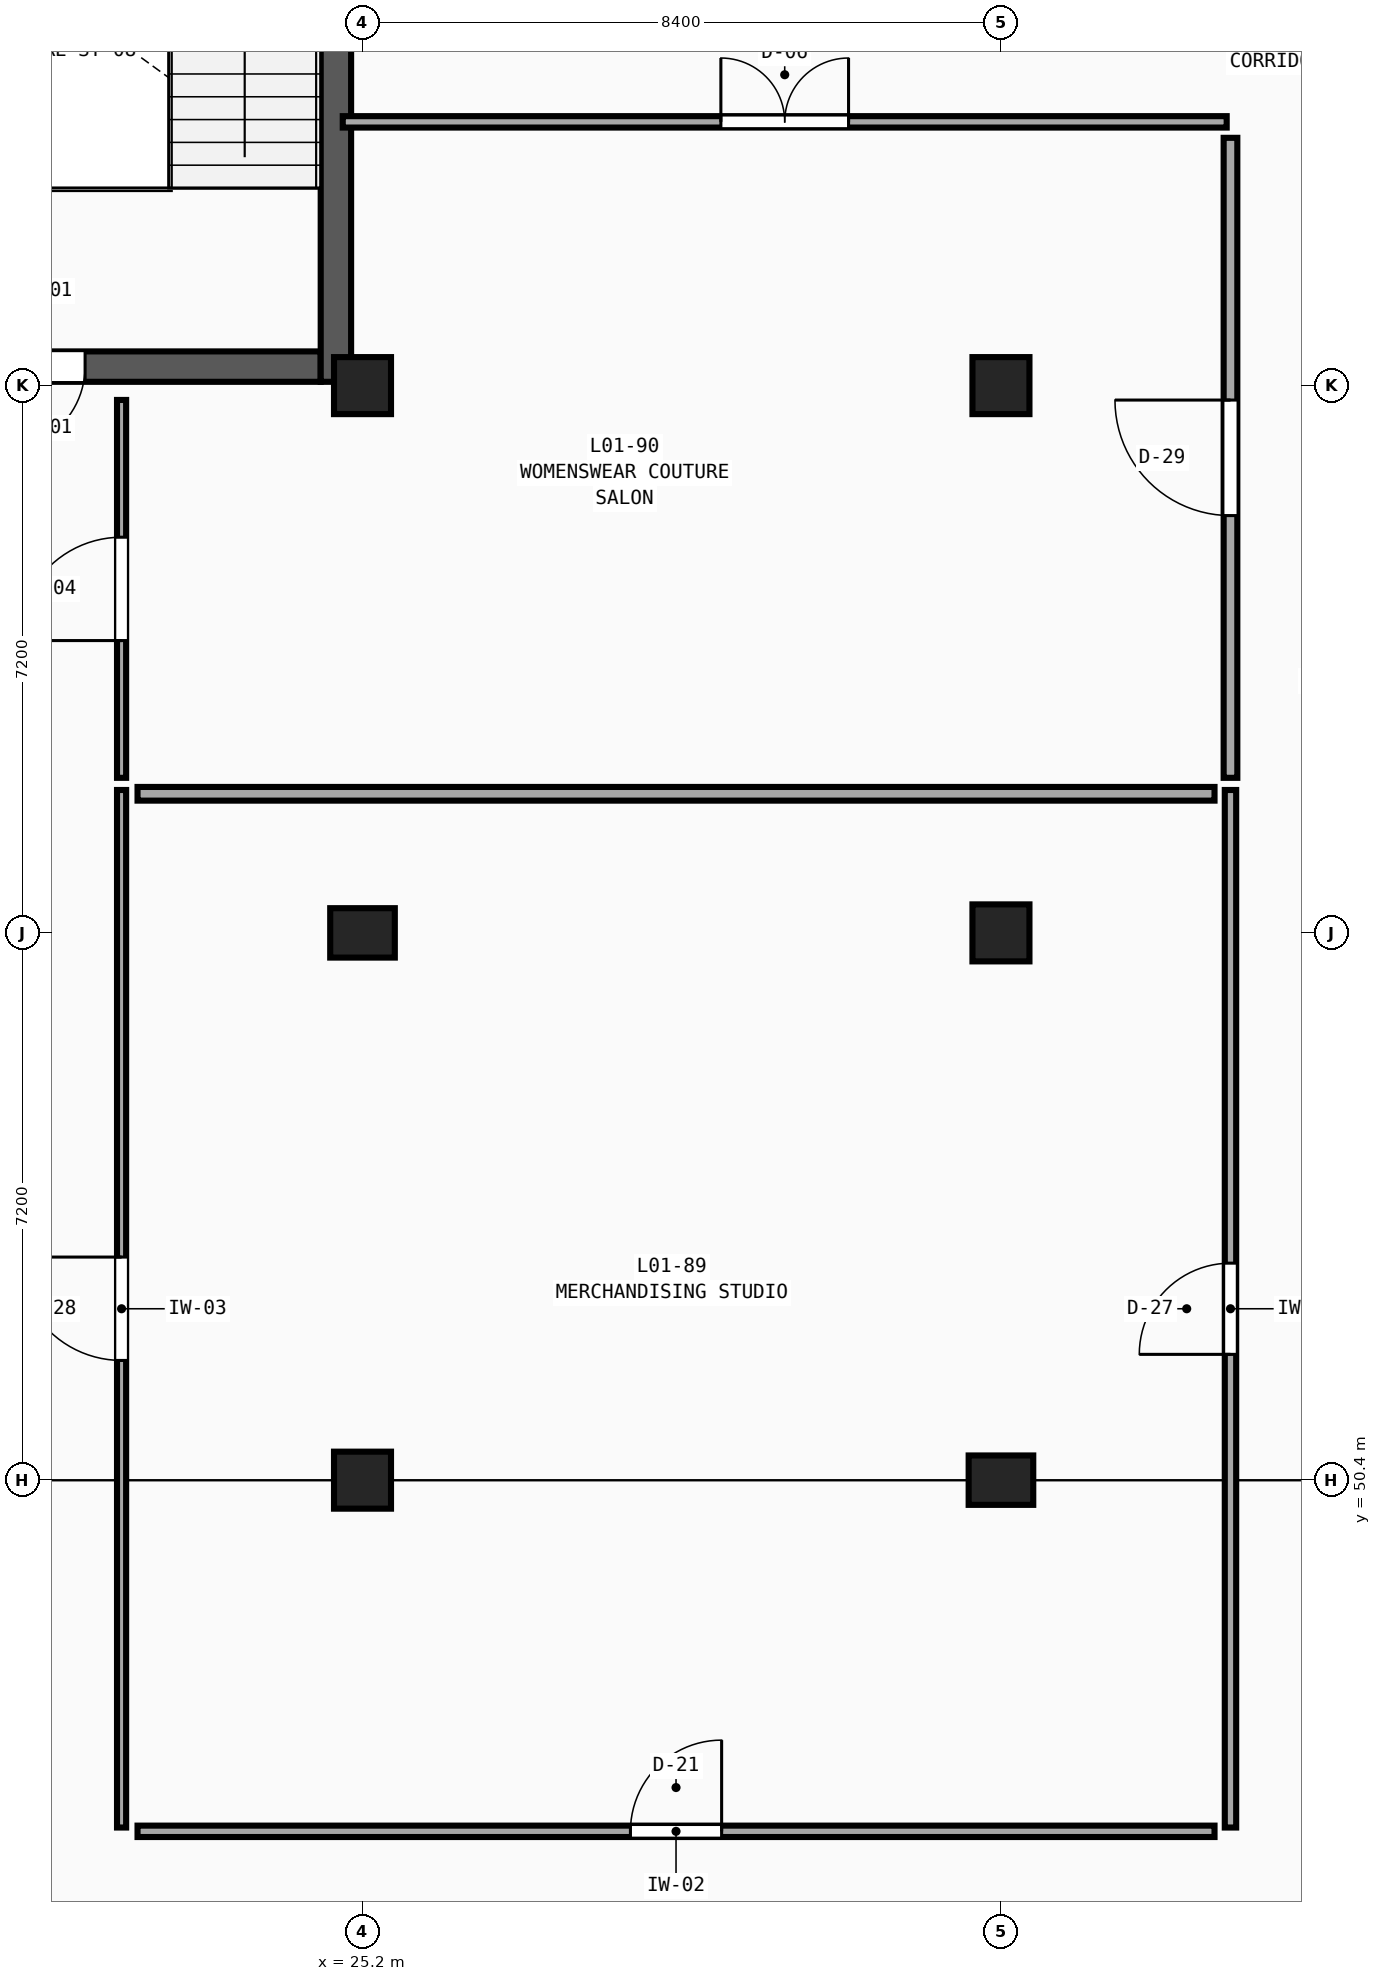
"""IFC4 building model, lengths in metres.
Left out: names, types, materials, properties, quantities, classifications, styles, units other than length and angle.
Written with IfcOpenShell. Run it as: python <this file> out.ifc"""

import sys

from ifc_helpers import new_model, si_unit, direction, frame, frame_2d, origin, origin_2d, place, context, subcontext, project, spatial, rectangle, extrude, element, fill, save


model = new_model("IFC4")
c1 = context("Model", 3, precision=1e-05, world=origin(), true_north=direction((0.0, 1.0)))
c2 = subcontext(c1, "Body", "Model", "MODEL_VIEW")
j1 = project(units=[si_unit("LENGTHUNIT", "METRE"), si_unit("PLANEANGLEUNIT", "RADIAN")], contexts=[c1])
p1 = place(None, origin())
s1 = spatial("IfcSite", under=j1, at=p1, CompositionType="ELEMENT")
p2 = place(p1, origin())
s2 = spatial("IfcBuilding", under=s1, at=p2, CompositionType="ELEMENT")
p3 = place(p2, frame((0.0, 0.0, 5.4)))
s3 = spatial("IfcBuildingStorey", under=s2, at=p3, CompositionType="ELEMENT", Elevation=5.4)
p4 = place(p3, frame((25.2, 50.4, 0.0), z_axis=(0.0, 0.0, 1.0), x_axis=(1.0, 0.0, 0.0)))
e1 = element("IfcColumn", 1, at=p4, inside=s3, PredefinedType="COLUMN", context=c2, shape_type="SweptSolid", body=[
    extrude(rectangle(XDim=0.75, YDim=0.75, at=origin_2d()), origin(), (0.0, 0.0, 1.0), 4.5),
])
p5 = place(p3, frame((25.2, 57.6, 0.0), z_axis=(0.0, 0.0, 1.0), x_axis=(1.0, 0.0, 0.0)))
e2 = element("IfcColumn", 2, at=p5, inside=s3, PredefinedType="COLUMN", context=c2, shape_type="SweptSolid", body=[
    extrude(rectangle(XDim=0.85, YDim=0.65, at=origin_2d()), origin(), (0.0, 0.0, 1.0), 4.5),
])
p6 = place(p3, frame((25.2, 64.8, 0.0), z_axis=(0.0, 0.0, 1.0), x_axis=(1.0, 0.0, 0.0)))
e3 = element("IfcColumn", 3, at=p6, inside=s3, PredefinedType="COLUMN", context=c2, shape_type="SweptSolid", body=[
    extrude(rectangle(XDim=0.75, YDim=0.75, at=origin_2d()), origin(), (0.0, 0.0, 1.0), 4.5),
])
p7 = place(p3, frame((33.6, 50.4, 0.0), z_axis=(0.0, 0.0, 1.0), x_axis=(1.0, 0.0, 0.0)))
e4 = element("IfcColumn", 4, at=p7, inside=s3, PredefinedType="COLUMN", context=c2, shape_type="SweptSolid", body=[
    extrude(rectangle(XDim=0.85, YDim=0.65, at=origin_2d()), origin(), (0.0, 0.0, 1.0), 4.5),
])
for number, where, z_axis, x_axis in (
    (5, (33.6, 57.6, 0.0), (0.0, 0.0, 1.0), (1.0, 0.0, 0.0)),
    (6, (33.6, 64.8, 0.0), (0.0, 0.0, 1.0), (1.0, 0.0, 0.0)),
):
    element("IfcColumn", number, at=place(p3, frame(where, z_axis=z_axis, x_axis=x_axis)), inside=s3, PredefinedType="COLUMN", context=c2, shape_type="SweptSolid", body=[
        extrude(rectangle(XDim=0.75, YDim=0.75, at=origin_2d()), origin(), (0.0, 0.0, 1.0), 4.5),
    ])
p8 = place(p3, frame((24.65, 65.05, 0.0), z_axis=(0.0, 0.0, 1.0), x_axis=(-1.0, 0.0, 0.0)))
e7 = element("IfcWall", 7, at=p8, inside=s3, PredefinedType="SHEAR", context=c2, shape_type="SweptSolid", body=[
    extrude(rectangle(XDim=7.3, YDim=0.4, at=frame_2d((3.65, 0.0))), origin(), (0.0, 0.0, 1.0), 4.5),
])
p9 = place(p8, frame((3.1, 0.0, 0.0)))
e8 = element("IfcOpeningElement", 8, at=p9, cuts=e7, PredefinedType="OPENING", context=c2, shape_type="SweptSolid", body=[
    extrude(rectangle(XDim=1.1, YDim=2.2, at=frame_2d((0.55, 1.1))), frame((0.0, 0.22, 0.0), z_axis=(0.0, -1.0, 0.0), x_axis=(1.0, 0.0, 0.0)), (0.0, 0.0, 1.0), 0.44),
])
p10 = place(p3, frame((24.85, 64.85, 0.0), z_axis=(0.0, 0.0, 1.0), x_axis=(0.0, 1.0, 0.0)))
e9 = element("IfcWall", 9, at=p10, inside=s3, PredefinedType="SHEAR", context=c2, shape_type="SweptSolid", body=[
    extrude(rectangle(XDim=8.25, YDim=0.4, at=frame_2d((4.125, 0.0))), origin(), (0.0, 0.0, 1.0), 4.5),
])
p11 = place(p3, frame((22.24, 45.78, 0.0), z_axis=(0.0, 0.0, 1.0), x_axis=(1.0, 0.0, 0.0)))
e10 = element("IfcWall", 10, at=p11, inside=s3, PredefinedType="PARTITIONING", context=c2, shape_type="SweptSolid", body=[
    extrude(rectangle(XDim=14.17, YDim=0.15, at=frame_2d((7.085, 0.0))), origin(), (0.0, 0.0, 1.0), 4.18),
])
p12 = place(p11, frame((6.485, 0.0, 0.0)))
e11 = element("IfcOpeningElement", 11, at=p12, cuts=e10, PredefinedType="OPENING", context=c2, shape_type="SweptSolid", body=[
    extrude(rectangle(XDim=1.2, YDim=2.29, at=frame_2d((0.6, 1.145))), frame((0.0, 0.095, 0.0), z_axis=(0.0, -1.0, 0.0), x_axis=(1.0, 0.0, 0.0)), (0.0, 0.0, 1.0), 0.19),
])
p13 = place(p3, frame((36.62, 45.83, 0.0), z_axis=(0.0, 0.0, 1.0), x_axis=(0.0, 1.0, 0.0)))
e12 = element("IfcWall", 12, at=p13, inside=s3, PredefinedType="PARTITIONING", context=c2, shape_type="SweptSolid", body=[
    extrude(rectangle(XDim=13.65, YDim=0.15, at=frame_2d((6.825, 0.0))), origin(), (0.0, 0.0, 1.0), 4.18),
])
p14 = place(p13, frame((6.225, 0.0, 0.0)))
e13 = element("IfcOpeningElement", 13, at=p14, cuts=e12, PredefinedType="OPENING", context=c2, shape_type="SweptSolid", body=[
    extrude(rectangle(XDim=1.2, YDim=2.37, at=frame_2d((0.6, 1.185))), frame((0.0, 0.095, 0.0), z_axis=(0.0, -1.0, 0.0), x_axis=(1.0, 0.0, 0.0)), (0.0, 0.0, 1.0), 0.19),
])
p15 = place(p3, frame((22.03, 45.83, 0.0), z_axis=(0.0, 0.0, 1.0), x_axis=(0.0, 1.0, 0.0)))
e14 = element("IfcWall", 14, at=p15, inside=s3, PredefinedType="PARTITIONING", context=c2, shape_type="SweptSolid", body=[
    extrude(rectangle(XDim=13.65, YDim=0.12, at=frame_2d((6.825, 0.0))), origin(), (0.0, 0.0, 1.0), 4.18),
])
p16 = place(p15, frame((6.145, 0.0, 0.0)))
e15 = element("IfcOpeningElement", 15, at=p16, cuts=e14, PredefinedType="OPENING", context=c2, shape_type="SweptSolid", body=[
    extrude(rectangle(XDim=1.36, YDim=2.37, at=frame_2d((0.68, 1.185))), frame((0.0, 0.08, 0.0), z_axis=(0.0, -1.0, 0.0), x_axis=(1.0, 0.0, 0.0)), (0.0, 0.0, 1.0), 0.16),
])
p17 = place(p3, frame((24.94, 68.27, 0.0), z_axis=(0.0, 0.0, 1.0), x_axis=(1.0, 0.0, 0.0)))
e16 = element("IfcWall", 16, at=p17, inside=s3, PredefinedType="PARTITIONING", context=c2, shape_type="SweptSolid", body=[
    extrude(rectangle(XDim=11.63, YDim=0.15, at=frame_2d((5.815, 0.0))), origin(), (0.0, 0.0, 1.0), 4.18),
])
p18 = place(p17, frame((4.975, 0.0, 0.0)))
e17 = element("IfcOpeningElement", 17, at=p18, cuts=e16, PredefinedType="OPENING", context=c2, shape_type="SweptSolid", body=[
    extrude(rectangle(XDim=1.68, YDim=2.05, at=frame_2d((0.84, 1.025))), frame((0.0, 0.095, 0.0), z_axis=(0.0, -1.0, 0.0), x_axis=(1.0, 0.0, 0.0)), (0.0, 0.0, 1.0), 0.19),
])
p19 = place(p3, frame((36.62, 59.64, 0.0), z_axis=(0.0, 0.0, 1.0), x_axis=(0.0, 1.0, 0.0)))
e18 = element("IfcWall", 18, at=p19, inside=s3, PredefinedType="PARTITIONING", context=c2, shape_type="SweptSolid", body=[
    extrude(rectangle(XDim=8.42, YDim=0.18, at=frame_2d((4.21, 0.0))), origin(), (0.0, 0.0, 1.0), 4.18),
])
p20 = place(p19, frame((3.45, 0.0, 0.0)))
e19 = element("IfcOpeningElement", 19, at=p20, cuts=e18, PredefinedType="OPENING", context=c2, shape_type="SweptSolid", body=[
    extrude(rectangle(XDim=1.52, YDim=2.37, at=frame_2d((0.76, 1.185))), frame((0.0, 0.11, 0.0), z_axis=(0.0, -1.0, 0.0), x_axis=(1.0, 0.0, 0.0)), (0.0, 0.0, 1.0), 0.22),
])
p21 = place(p3, frame((22.03, 59.64, 0.0), z_axis=(0.0, 0.0, 1.0), x_axis=(0.0, 1.0, 0.0)))
e20 = element("IfcWall", 20, at=p21, inside=s3, PredefinedType="PARTITIONING", context=c2, shape_type="SweptSolid", body=[
    extrude(rectangle(XDim=4.971, YDim=0.12, at=frame_2d((2.486, 0.0))), origin(), (0.0, 0.0, 1.0), 4.18),
])
p22 = place(p21, frame((1.806, 0.0, 0.0)))
e21 = element("IfcOpeningElement", 21, at=p22, cuts=e20, PredefinedType="OPENING", context=c2, shape_type="SweptSolid", body=[
    extrude(rectangle(XDim=1.36, YDim=2.05, at=frame_2d((0.68, 1.025))), frame((0.0, 0.08, 0.0), z_axis=(0.0, -1.0, 0.0), x_axis=(1.0, 0.0, 0.0)), (0.0, 0.0, 1.0), 0.16),
])
p23 = place(p3, frame((22.24, 59.43, 0.0), z_axis=(0.0, 0.0, 1.0), x_axis=(1.0, 0.0, 0.0)))
e22 = element("IfcWall", 22, at=p23, inside=s3, PredefinedType="PARTITIONING", context=c2, shape_type="SweptSolid", body=[
    extrude(rectangle(XDim=14.17, YDim=0.18, at=frame_2d((7.085, 0.0))), origin(), (0.0, 0.0, 1.0), 4.18),
])
p24 = place(p9, origin())
e23 = element("IfcDoor", 23, at=p24, inside=s3, OperationType="SINGLE_SWING_RIGHT", PredefinedType="DOOR", context=c2, shape_type="SweptSolid", body=[
    extrude(rectangle(XDim=1.1, YDim=2.2, at=frame_2d((0.55, 1.1))), frame((0.0, 0.025, 0.0), z_axis=(0.0, -1.0, 0.0), x_axis=(1.0, 0.0, 0.0)), (0.0, 0.0, 1.0), 0.05),
])
fill(e8, e23)
p25 = place(p12, origin())
e24 = element("IfcDoor", 24, at=p25, inside=s3, OperationType="SINGLE_SWING_RIGHT", PredefinedType="DOOR", context=c2, shape_type="SweptSolid", body=[
    extrude(rectangle(XDim=1.2, YDim=2.29, at=frame_2d((0.6, 1.145))), frame((0.0, 0.025, 0.0), z_axis=(0.0, -1.0, 0.0), x_axis=(1.0, 0.0, 0.0)), (0.0, 0.0, 1.0), 0.05),
])
fill(e11, e24)
p26 = place(p14, origin())
e25 = element("IfcDoor", 25, at=p26, inside=s3, OperationType="SINGLE_SWING_LEFT", PredefinedType="DOOR", context=c2, shape_type="SweptSolid", body=[
    extrude(rectangle(XDim=1.2, YDim=2.37, at=frame_2d((0.6, 1.185))), frame((0.0, 0.025, 0.0), z_axis=(0.0, -1.0, 0.0), x_axis=(1.0, 0.0, 0.0)), (0.0, 0.0, 1.0), 0.05),
])
fill(e13, e25)
p27 = place(p16, origin())
e26 = element("IfcDoor", 26, at=p27, inside=s3, OperationType="SINGLE_SWING_RIGHT", PredefinedType="DOOR", context=c2, shape_type="SweptSolid", body=[
    extrude(rectangle(XDim=1.36, YDim=2.37, at=frame_2d((0.68, 1.185))), frame((0.0, 0.025, 0.0), z_axis=(0.0, -1.0, 0.0), x_axis=(1.0, 0.0, 0.0)), (0.0, 0.0, 1.0), 0.05),
])
fill(e15, e26)
p28 = place(p18, origin())
e27 = element("IfcDoor", 27, at=p28, inside=s3, OperationType="DOUBLE_DOOR_SINGLE_SWING", PredefinedType="DOOR", context=c2, shape_type="SweptSolid", body=[
    extrude(rectangle(XDim=1.68, YDim=2.05, at=frame_2d((0.84, 1.025))), frame((0.0, 0.025, 0.0), z_axis=(0.0, -1.0, 0.0), x_axis=(1.0, 0.0, 0.0)), (0.0, 0.0, 1.0), 0.05),
])
fill(e17, e27)
p29 = place(p20, origin())
e28 = element("IfcDoor", 28, at=p29, inside=s3, OperationType="SINGLE_SWING_RIGHT", PredefinedType="DOOR", context=c2, shape_type="SweptSolid", body=[
    extrude(rectangle(XDim=1.52, YDim=2.37, at=frame_2d((0.76, 1.185))), frame((0.0, 0.025, 0.0), z_axis=(0.0, -1.0, 0.0), x_axis=(1.0, 0.0, 0.0)), (0.0, 0.0, 1.0), 0.05),
])
fill(e19, e28)
p30 = place(p22, origin())
e29 = element("IfcDoor", 29, at=p30, inside=s3, OperationType="SINGLE_SWING_LEFT", PredefinedType="DOOR", context=c2, shape_type="SweptSolid", body=[
    extrude(rectangle(XDim=1.36, YDim=2.05, at=frame_2d((0.68, 1.025))), frame((0.0, 0.025, 0.0), z_axis=(0.0, -1.0, 0.0), x_axis=(1.0, 0.0, 0.0)), (0.0, 0.0, 1.0), 0.05),
])
fill(e21, e29)
save(model, sys.argv[1])
